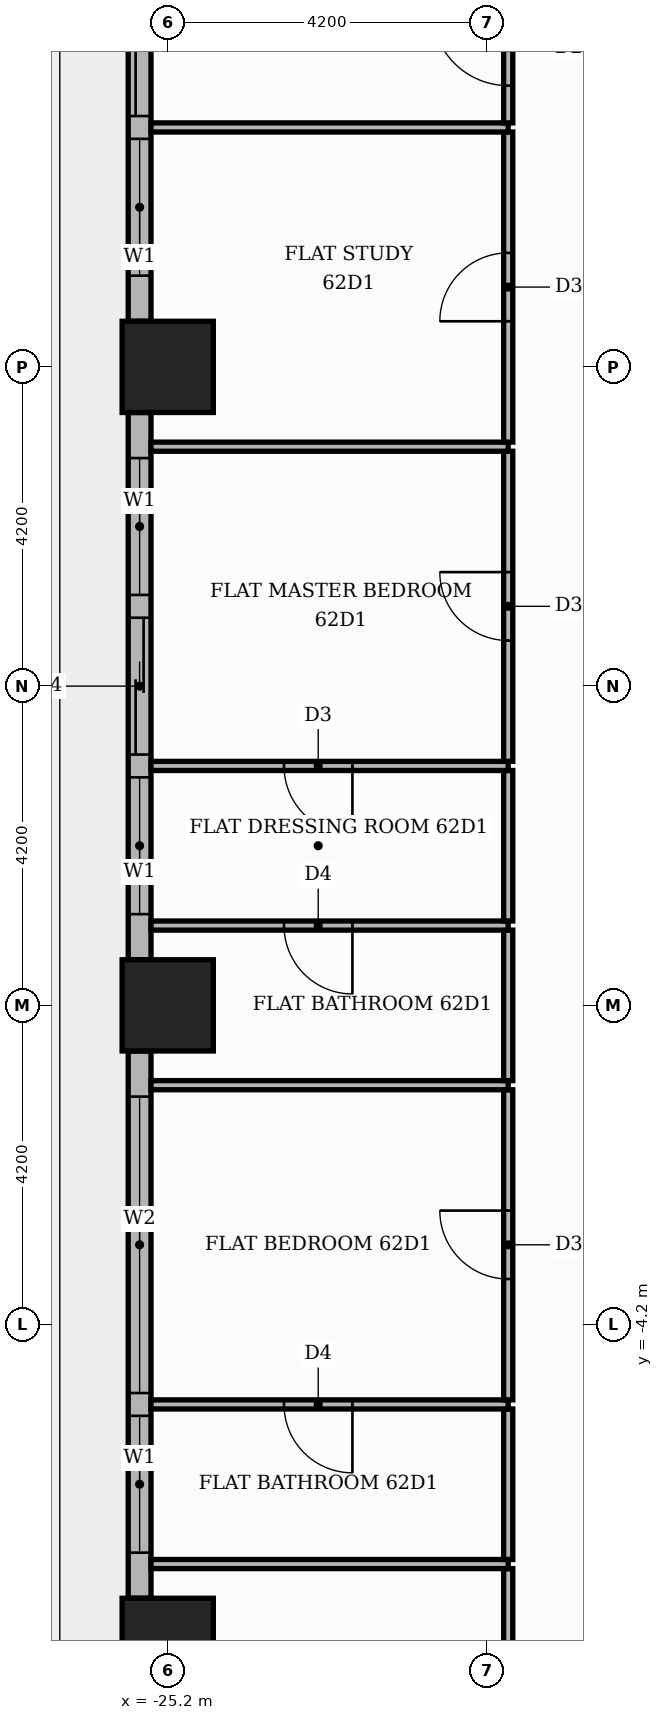
"""IFC4 building model, lengths in metres.
Left out: names, types, materials, properties, quantities, classifications, styles, units other than length and angle.
Written with IfcOpenShell. Run it as: python <this file> out.ifc"""

import sys

from ifc_helpers import new_model, si_unit, direction, frame, frame_2d, origin, origin_2d, place, context, subcontext, project, spatial, rectangle, extrude, element, fill, save


model = new_model("IFC4")
c1 = context("Model", 3, precision=1e-05, world=origin(), true_north=direction((0.0, 1.0)))
c2 = subcontext(c1, "Body", "Model", "MODEL_VIEW")
j1 = project(units=[si_unit("LENGTHUNIT", "METRE"), si_unit("PLANEANGLEUNIT", "RADIAN")], contexts=[c1])
p1 = place(None, origin())
s1 = spatial("IfcSite", under=j1, at=p1, CompositionType="ELEMENT")
p2 = place(p1, origin())
s2 = spatial("IfcBuilding", under=s1, at=p2, CompositionType="ELEMENT")
p3 = place(p2, frame((0.0, 0.0, 260.1)))
s3 = spatial("IfcBuildingStorey", under=s2, at=p3, CompositionType="ELEMENT", Elevation=260.1)
for number, where, z_axis, x_axis in (
    (1, (-25.2, 0.0, 0.0), (0.0, 0.0, 1.0), (1.0, 0.0, 0.0)),
    (2, (-25.2, -8.4, 0.0), (0.0, 0.0, 1.0), (1.0, 0.0, 0.0)),
    (3, (-25.2, 8.4, 0.0), (0.0, 0.0, 1.0), (1.0, 0.0, 0.0)),
):
    element("IfcColumn", number, at=place(p3, frame(where, z_axis=z_axis, x_axis=x_axis)), inside=s3, PredefinedType="COLUMN", context=c2, shape_type="SweptSolid", body=[
        extrude(rectangle(XDim=1.2, YDim=1.2, at=origin_2d()), origin(), (0.0, 0.0, 1.0), 3.9),
    ])
p4 = place(p3, frame((-25.57, 16.2, 0.0), z_axis=(0.0, 0.0, 1.0), x_axis=(0.0, -1.0, 0.0)))
e4 = element("IfcWall", 4, at=p4, inside=s3, PredefinedType="STANDARD", context=c2, shape_type="SweptSolid", body=[
    extrude(rectangle(XDim=7.2, YDim=0.3, at=frame_2d((3.6, 0.0))), origin(), (0.0, 0.0, 1.0), 3.48),
])
p5 = place(p4, frame((0.6, 0.0, 0.0)))
e5 = element("IfcOpeningElement", 5, at=p5, cuts=e4, PredefinedType="OPENING", context=c2, shape_type="SweptSolid", body=[
    extrude(rectangle(XDim=3.9, YDim=2.4, at=frame_2d((1.95, 1.2))), frame((0.0, 0.16, 0.0), z_axis=(0.0, -1.0, 0.0), x_axis=(1.0, 0.0, 0.0)), (0.0, 0.0, 1.0), 0.32),
])
p6 = place(p4, frame((4.8, 0.0, 0.9)))
e6 = element("IfcOpeningElement", 6, at=p6, cuts=e4, PredefinedType="OPENING", context=c2, shape_type="SweptSolid", body=[
    extrude(rectangle(XDim=1.8, YDim=2.1, at=frame_2d((0.9, 1.05))), frame((0.0, 0.16, 0.0), z_axis=(0.0, -1.0, 0.0), x_axis=(1.0, 0.0, 0.0)), (0.0, 0.0, 1.0), 0.32),
])
p7 = place(p3, frame((-25.57, 7.8, 0.0), z_axis=(0.0, 0.0, 1.0), x_axis=(0.0, -1.0, 0.0)))
e7 = element("IfcWall", 7, at=p7, inside=s3, PredefinedType="STANDARD", context=c2, shape_type="SweptSolid", body=[
    extrude(rectangle(XDim=7.2, YDim=0.3, at=frame_2d((3.6, 0.0))), origin(), (0.0, 0.0, 1.0), 3.48),
])
p8 = place(p7, frame((0.6, 0.0, 0.9)))
e8 = element("IfcOpeningElement", 8, at=p8, cuts=e7, PredefinedType="OPENING", context=c2, shape_type="SweptSolid", body=[
    extrude(rectangle(XDim=1.8, YDim=2.1, at=frame_2d((0.9, 1.05))), frame((0.0, 0.16, 0.0), z_axis=(0.0, -1.0, 0.0), x_axis=(1.0, 0.0, 0.0)), (0.0, 0.0, 1.0), 0.32),
])
p9 = place(p7, frame((2.7, 0.0, 0.0)))
e9 = element("IfcOpeningElement", 9, at=p9, cuts=e7, PredefinedType="OPENING", context=c2, shape_type="SweptSolid", body=[
    extrude(rectangle(XDim=1.8, YDim=2.4, at=frame_2d((0.9, 1.2))), frame((0.0, 0.16, 0.0), z_axis=(0.0, -1.0, 0.0), x_axis=(1.0, 0.0, 0.0)), (0.0, 0.0, 1.0), 0.32),
])
p10 = place(p7, frame((4.8, 0.0, 0.9)))
e10 = element("IfcOpeningElement", 10, at=p10, cuts=e7, PredefinedType="OPENING", context=c2, shape_type="SweptSolid", body=[
    extrude(rectangle(XDim=1.8, YDim=2.1, at=frame_2d((0.9, 1.05))), frame((0.0, 0.16, 0.0), z_axis=(0.0, -1.0, 0.0), x_axis=(1.0, 0.0, 0.0)), (0.0, 0.0, 1.0), 0.32),
])
p11 = place(p3, frame((-25.57, -0.6, 0.0), z_axis=(0.0, 0.0, 1.0), x_axis=(0.0, -1.0, 0.0)))
e11 = element("IfcWall", 11, at=p11, inside=s3, PredefinedType="STANDARD", context=c2, shape_type="SweptSolid", body=[
    extrude(rectangle(XDim=7.2, YDim=0.3, at=frame_2d((3.6, 0.0))), origin(), (0.0, 0.0, 1.0), 3.48),
])
p12 = place(p11, frame((0.6, 0.0, 0.9)))
e12 = element("IfcOpeningElement", 12, at=p12, cuts=e11, PredefinedType="OPENING", context=c2, shape_type="SweptSolid", body=[
    extrude(rectangle(XDim=3.9, YDim=2.1, at=frame_2d((1.95, 1.05))), frame((0.0, 0.16, 0.0), z_axis=(0.0, -1.0, 0.0), x_axis=(1.0, 0.0, 0.0)), (0.0, 0.0, 1.0), 0.32),
])
p13 = place(p11, frame((4.8, 0.0, 0.9)))
e13 = element("IfcOpeningElement", 13, at=p13, cuts=e11, PredefinedType="OPENING", context=c2, shape_type="SweptSolid", body=[
    extrude(rectangle(XDim=1.8, YDim=2.1, at=frame_2d((0.9, 1.05))), frame((0.0, 0.16, 0.0), z_axis=(0.0, -1.0, 0.0), x_axis=(1.0, 0.0, 0.0)), (0.0, 0.0, 1.0), 0.32),
])
p14 = place(p3, frame((-20.72, -11.49, 0.0), z_axis=(0.0, 0.0, 1.0), x_axis=(0.0, 1.0, 0.0)))
e14 = element("IfcWall", 14, at=p14, inside=s3, PredefinedType="PARTITIONING", context=c2, shape_type="SweptSolid", body=[
    extrude(rectangle(XDim=4.08, YDim=0.12, at=frame_2d((2.04, 0.0))), origin(), (0.0, 0.0, 1.0), 3.48),
])
p15 = place(p14, frame((1.59, 0.0, 0.0)))
e15 = element("IfcOpeningElement", 15, at=p15, cuts=e14, PredefinedType="OPENING", context=c2, shape_type="SweptSolid", body=[
    extrude(rectangle(XDim=0.9, YDim=2.1, at=frame_2d((0.45, 1.05))), frame((0.0, 0.07, 0.0), z_axis=(0.0, -1.0, 0.0), x_axis=(1.0, 0.0, 0.0)), (0.0, 0.0, 1.0), 0.14),
])
p16 = place(p3, frame((-25.42, -7.35, 0.0), z_axis=(0.0, 0.0, 1.0), x_axis=(1.0, 0.0, 0.0)))
e16 = element("IfcWall", 16, at=p16, inside=s3, PredefinedType="PARTITIONING", context=c2, shape_type="SweptSolid", body=[
    extrude(rectangle(XDim=4.7, YDim=0.12, at=frame_2d((2.35, 0.0))), origin(), (0.0, 0.0, 1.0), 3.48),
])
p17 = place(p3, frame((-20.72, -7.29, 0.0), z_axis=(0.0, 0.0, 1.0), x_axis=(0.0, 1.0, 0.0)))
e17 = element("IfcWall", 17, at=p17, inside=s3, PredefinedType="PARTITIONING", context=c2, shape_type="SweptSolid", body=[
    extrude(rectangle(XDim=1.98, YDim=0.12, at=frame_2d((0.99, 0.0))), origin(), (0.0, 0.0, 1.0), 3.48),
])
p18 = place(p3, frame((-25.42, -5.25, 0.0), z_axis=(0.0, 0.0, 1.0), x_axis=(1.0, 0.0, 0.0)))
e18 = element("IfcWall", 18, at=p18, inside=s3, PredefinedType="PARTITIONING", context=c2, shape_type="SweptSolid", body=[
    extrude(rectangle(XDim=4.7, YDim=0.12, at=frame_2d((2.35, 0.0))), origin(), (0.0, 0.0, 1.0), 3.48),
])
p19 = place(p18, frame((1.75, 0.0, 0.0)))
e19 = element("IfcOpeningElement", 19, at=p19, cuts=e18, PredefinedType="OPENING", context=c2, shape_type="SweptSolid", body=[
    extrude(rectangle(XDim=0.9, YDim=2.1, at=frame_2d((0.45, 1.05))), frame((0.0, 0.07, 0.0), z_axis=(0.0, -1.0, 0.0), x_axis=(1.0, 0.0, 0.0)), (0.0, 0.0, 1.0), 0.14),
])
p20 = place(p3, frame((-20.72, -5.19, 0.0), z_axis=(0.0, 0.0, 1.0), x_axis=(0.0, 1.0, 0.0)))
e20 = element("IfcWall", 20, at=p20, inside=s3, PredefinedType="PARTITIONING", context=c2, shape_type="SweptSolid", body=[
    extrude(rectangle(XDim=4.08, YDim=0.12, at=frame_2d((2.04, 0.0))), origin(), (0.0, 0.0, 1.0), 3.48),
])
p21 = place(p20, frame((1.59, 0.0, 0.0)))
e21 = element("IfcOpeningElement", 21, at=p21, cuts=e20, PredefinedType="OPENING", context=c2, shape_type="SweptSolid", body=[
    extrude(rectangle(XDim=0.9, YDim=2.1, at=frame_2d((0.45, 1.05))), frame((0.0, 0.07, 0.0), z_axis=(0.0, -1.0, 0.0), x_axis=(1.0, 0.0, 0.0)), (0.0, 0.0, 1.0), 0.14),
])
p22 = place(p3, frame((-25.42, -1.05, 0.0), z_axis=(0.0, 0.0, 1.0), x_axis=(1.0, 0.0, 0.0)))
e22 = element("IfcWall", 22, at=p22, inside=s3, PredefinedType="PARTITIONING", context=c2, shape_type="SweptSolid", body=[
    extrude(rectangle(XDim=4.7, YDim=0.12, at=frame_2d((2.35, 0.0))), origin(), (0.0, 0.0, 1.0), 3.48),
])
p23 = place(p3, frame((-20.72, -0.99, 0.0), z_axis=(0.0, 0.0, 1.0), x_axis=(0.0, 1.0, 0.0)))
e23 = element("IfcWall", 23, at=p23, inside=s3, PredefinedType="PARTITIONING", context=c2, shape_type="SweptSolid", body=[
    extrude(rectangle(XDim=1.98, YDim=0.12, at=frame_2d((0.99, 0.0))), origin(), (0.0, 0.0, 1.0), 3.48),
])
p24 = place(p3, frame((-25.42, 1.05, 0.0), z_axis=(0.0, 0.0, 1.0), x_axis=(1.0, 0.0, 0.0)))
e24 = element("IfcWall", 24, at=p24, inside=s3, PredefinedType="PARTITIONING", context=c2, shape_type="SweptSolid", body=[
    extrude(rectangle(XDim=4.7, YDim=0.12, at=frame_2d((2.35, 0.0))), origin(), (0.0, 0.0, 1.0), 3.48),
])
p25 = place(p24, frame((1.75, 0.0, 0.0)))
e25 = element("IfcOpeningElement", 25, at=p25, cuts=e24, PredefinedType="OPENING", context=c2, shape_type="SweptSolid", body=[
    extrude(rectangle(XDim=0.9, YDim=2.1, at=frame_2d((0.45, 1.05))), frame((0.0, 0.07, 0.0), z_axis=(0.0, -1.0, 0.0), x_axis=(1.0, 0.0, 0.0)), (0.0, 0.0, 1.0), 0.14),
])
p26 = place(p3, frame((-20.72, 1.11, 0.0), z_axis=(0.0, 0.0, 1.0), x_axis=(0.0, 1.0, 0.0)))
e26 = element("IfcWall", 26, at=p26, inside=s3, PredefinedType="PARTITIONING", context=c2, shape_type="SweptSolid", body=[
    extrude(rectangle(XDim=1.98, YDim=0.12, at=frame_2d((0.99, 0.0))), origin(), (0.0, 0.0, 1.0), 3.48),
])
p27 = place(p3, frame((-25.42, 3.15, 0.0), z_axis=(0.0, 0.0, 1.0), x_axis=(1.0, 0.0, 0.0)))
e27 = element("IfcWall", 27, at=p27, inside=s3, PredefinedType="PARTITIONING", context=c2, shape_type="SweptSolid", body=[
    extrude(rectangle(XDim=4.7, YDim=0.12, at=frame_2d((2.35, 0.0))), origin(), (0.0, 0.0, 1.0), 3.48),
])
p28 = place(p27, frame((1.75, 0.0, 0.0)))
e28 = element("IfcOpeningElement", 28, at=p28, cuts=e27, PredefinedType="OPENING", context=c2, shape_type="SweptSolid", body=[
    extrude(rectangle(XDim=0.9, YDim=2.1, at=frame_2d((0.45, 1.05))), frame((0.0, 0.07, 0.0), z_axis=(0.0, -1.0, 0.0), x_axis=(1.0, 0.0, 0.0)), (0.0, 0.0, 1.0), 0.14),
])
p29 = place(p3, frame((-20.72, 3.21, 0.0), z_axis=(0.0, 0.0, 1.0), x_axis=(0.0, 1.0, 0.0)))
e29 = element("IfcWall", 29, at=p29, inside=s3, PredefinedType="PARTITIONING", context=c2, shape_type="SweptSolid", body=[
    extrude(rectangle(XDim=4.08, YDim=0.12, at=frame_2d((2.04, 0.0))), origin(), (0.0, 0.0, 1.0), 3.48),
])
p30 = place(p29, frame((1.59, 0.0, 0.0)))
e30 = element("IfcOpeningElement", 30, at=p30, cuts=e29, PredefinedType="OPENING", context=c2, shape_type="SweptSolid", body=[
    extrude(rectangle(XDim=0.9, YDim=2.1, at=frame_2d((0.45, 1.05))), frame((0.0, 0.07, 0.0), z_axis=(0.0, -1.0, 0.0), x_axis=(1.0, 0.0, 0.0)), (0.0, 0.0, 1.0), 0.14),
])
p31 = place(p3, frame((-25.42, 7.35, 0.0), z_axis=(0.0, 0.0, 1.0), x_axis=(1.0, 0.0, 0.0)))
e31 = element("IfcWall", 31, at=p31, inside=s3, PredefinedType="PARTITIONING", context=c2, shape_type="SweptSolid", body=[
    extrude(rectangle(XDim=4.7, YDim=0.12, at=frame_2d((2.35, 0.0))), origin(), (0.0, 0.0, 1.0), 3.48),
])
p32 = place(p3, frame((-20.72, 7.41, 0.0), z_axis=(0.0, 0.0, 1.0), x_axis=(0.0, 1.0, 0.0)))
e32 = element("IfcWall", 32, at=p32, inside=s3, PredefinedType="PARTITIONING", context=c2, shape_type="SweptSolid", body=[
    extrude(rectangle(XDim=4.08, YDim=0.12, at=frame_2d((2.04, 0.0))), origin(), (0.0, 0.0, 1.0), 3.48),
])
p33 = place(p32, frame((1.59, 0.0, 0.0)))
e33 = element("IfcOpeningElement", 33, at=p33, cuts=e32, PredefinedType="OPENING", context=c2, shape_type="SweptSolid", body=[
    extrude(rectangle(XDim=0.9, YDim=2.1, at=frame_2d((0.45, 1.05))), frame((0.0, 0.07, 0.0), z_axis=(0.0, -1.0, 0.0), x_axis=(1.0, 0.0, 0.0)), (0.0, 0.0, 1.0), 0.14),
])
p34 = place(p3, frame((-25.42, 11.55, 0.0), z_axis=(0.0, 0.0, 1.0), x_axis=(1.0, 0.0, 0.0)))
e34 = element("IfcWall", 34, at=p34, inside=s3, PredefinedType="PARTITIONING", context=c2, shape_type="SweptSolid", body=[
    extrude(rectangle(XDim=4.7, YDim=0.12, at=frame_2d((2.35, 0.0))), origin(), (0.0, 0.0, 1.0), 3.48),
])
p35 = place(p3, frame((-20.72, 11.61, 0.0), z_axis=(0.0, 0.0, 1.0), x_axis=(0.0, 1.0, 0.0)))
e35 = element("IfcWall", 35, at=p35, inside=s3, PredefinedType="PARTITIONING", context=c2, shape_type="SweptSolid", body=[
    extrude(rectangle(XDim=1.98, YDim=0.12, at=frame_2d((0.99, 0.0))), origin(), (0.0, 0.0, 1.0), 3.48),
])
p36 = place(p35, frame((0.49, 0.0, 0.0)))
e36 = element("IfcOpeningElement", 36, at=p36, cuts=e35, PredefinedType="OPENING", context=c2, shape_type="SweptSolid", body=[
    extrude(rectangle(XDim=1.0, YDim=2.1, at=frame_2d((0.5, 1.05))), frame((0.0, 0.07, 0.0), z_axis=(0.0, -1.0, 0.0), x_axis=(1.0, 0.0, 0.0)), (0.0, 0.0, 1.0), 0.14),
])
p37 = place(p5, origin())
e37 = element("IfcDoor", 37, at=p37, inside=s3, OperationType="SLIDING_TO_LEFT", PredefinedType="DOOR", context=c2, shape_type="SweptSolid", body=[
    extrude(rectangle(XDim=3.9, YDim=2.4, at=frame_2d((1.95, 1.2))), frame((0.0, 0.025, 0.0), z_axis=(0.0, -1.0, 0.0), x_axis=(1.0, 0.0, 0.0)), (0.0, 0.0, 1.0), 0.05),
])
fill(e5, e37)
p38 = place(p6, origin())
e38 = element("IfcWindow", 38, at=p38, inside=s3, PartitioningType="SINGLE_PANEL", PredefinedType="WINDOW", context=c2, shape_type="SweptSolid", body=[
    extrude(rectangle(XDim=1.8, YDim=2.1, at=frame_2d((0.9, 1.05))), frame((0.0, 0.03, 0.0), z_axis=(0.0, -1.0, 0.0), x_axis=(1.0, 0.0, 0.0)), (0.0, 0.0, 1.0), 0.06),
])
fill(e6, e38)
p39 = place(p8, origin())
e39 = element("IfcWindow", 39, at=p39, inside=s3, PartitioningType="SINGLE_PANEL", PredefinedType="WINDOW", context=c2, shape_type="SweptSolid", body=[
    extrude(rectangle(XDim=1.8, YDim=2.1, at=frame_2d((0.9, 1.05))), frame((0.0, 0.03, 0.0), z_axis=(0.0, -1.0, 0.0), x_axis=(1.0, 0.0, 0.0)), (0.0, 0.0, 1.0), 0.06),
])
fill(e8, e39)
p40 = place(p9, origin())
e40 = element("IfcDoor", 40, at=p40, inside=s3, OperationType="SLIDING_TO_LEFT", PredefinedType="DOOR", context=c2, shape_type="SweptSolid", body=[
    extrude(rectangle(XDim=1.8, YDim=2.4, at=frame_2d((0.9, 1.2))), frame((0.0, 0.025, 0.0), z_axis=(0.0, -1.0, 0.0), x_axis=(1.0, 0.0, 0.0)), (0.0, 0.0, 1.0), 0.05),
])
fill(e9, e40)
p41 = place(p10, origin())
e41 = element("IfcWindow", 41, at=p41, inside=s3, PartitioningType="SINGLE_PANEL", PredefinedType="WINDOW", context=c2, shape_type="SweptSolid", body=[
    extrude(rectangle(XDim=1.8, YDim=2.1, at=frame_2d((0.9, 1.05))), frame((0.0, 0.03, 0.0), z_axis=(0.0, -1.0, 0.0), x_axis=(1.0, 0.0, 0.0)), (0.0, 0.0, 1.0), 0.06),
])
fill(e10, e41)
p42 = place(p12, origin())
e42 = element("IfcWindow", 42, at=p42, inside=s3, PartitioningType="SINGLE_PANEL", PredefinedType="WINDOW", context=c2, shape_type="SweptSolid", body=[
    extrude(rectangle(XDim=3.9, YDim=2.1, at=frame_2d((1.95, 1.05))), frame((0.0, 0.03, 0.0), z_axis=(0.0, -1.0, 0.0), x_axis=(1.0, 0.0, 0.0)), (0.0, 0.0, 1.0), 0.06),
])
fill(e12, e42)
p43 = place(p13, origin())
e43 = element("IfcWindow", 43, at=p43, inside=s3, PartitioningType="SINGLE_PANEL", PredefinedType="WINDOW", context=c2, shape_type="SweptSolid", body=[
    extrude(rectangle(XDim=1.8, YDim=2.1, at=frame_2d((0.9, 1.05))), frame((0.0, 0.03, 0.0), z_axis=(0.0, -1.0, 0.0), x_axis=(1.0, 0.0, 0.0)), (0.0, 0.0, 1.0), 0.06),
])
fill(e13, e43)
p44 = place(p36, origin())
e44 = element("IfcDoor", 44, at=p44, inside=s3, OperationType="SINGLE_SWING_RIGHT", PredefinedType="DOOR", context=c2, shape_type="SweptSolid", body=[
    extrude(rectangle(XDim=1.0, YDim=2.1, at=frame_2d((0.5, 1.05))), frame((0.0, 0.025, 0.0), z_axis=(0.0, -1.0, 0.0), x_axis=(1.0, 0.0, 0.0)), (0.0, 0.0, 1.0), 0.05),
])
fill(e36, e44)
p45 = place(p33, origin())
e45 = element("IfcDoor", 45, at=p45, inside=s3, OperationType="SINGLE_SWING_LEFT", PredefinedType="DOOR", context=c2, shape_type="SweptSolid", body=[
    extrude(rectangle(XDim=0.9, YDim=2.1, at=frame_2d((0.45, 1.05))), frame((0.0, 0.025, 0.0), z_axis=(0.0, -1.0, 0.0), x_axis=(1.0, 0.0, 0.0)), (0.0, 0.0, 1.0), 0.05),
])
fill(e33, e45)
p46 = place(p30, origin())
e46 = element("IfcDoor", 46, at=p46, inside=s3, OperationType="SINGLE_SWING_RIGHT", PredefinedType="DOOR", context=c2, shape_type="SweptSolid", body=[
    extrude(rectangle(XDim=0.9, YDim=2.1, at=frame_2d((0.45, 1.05))), frame((0.0, 0.025, 0.0), z_axis=(0.0, -1.0, 0.0), x_axis=(1.0, 0.0, 0.0)), (0.0, 0.0, 1.0), 0.05),
])
fill(e30, e46)
p47 = place(p28, frame((0.9, 0.0, 0.0), z_axis=(0.0, 0.0, 1.0), x_axis=(-1.0, 0.0, 0.0)))
e47 = element("IfcDoor", 47, at=p47, inside=s3, OperationType="SINGLE_SWING_RIGHT", PredefinedType="DOOR", context=c2, shape_type="SweptSolid", body=[
    extrude(rectangle(XDim=0.9, YDim=2.1, at=frame_2d((0.45, 1.05))), frame((0.0, 0.025, 0.0), z_axis=(0.0, -1.0, 0.0), x_axis=(1.0, 0.0, 0.0)), (0.0, 0.0, 1.0), 0.05),
])
fill(e28, e47)
p48 = place(p25, frame((0.9, 0.0, 0.0), z_axis=(0.0, 0.0, 1.0), x_axis=(-1.0, 0.0, 0.0)))
e48 = element("IfcDoor", 48, at=p48, inside=s3, OperationType="SINGLE_SWING_RIGHT", PredefinedType="DOOR", context=c2, shape_type="SweptSolid", body=[
    extrude(rectangle(XDim=0.9, YDim=2.1, at=frame_2d((0.45, 1.05))), frame((0.0, 0.025, 0.0), z_axis=(0.0, -1.0, 0.0), x_axis=(1.0, 0.0, 0.0)), (0.0, 0.0, 1.0), 0.05),
])
fill(e25, e48)
p49 = place(p21, origin())
e49 = element("IfcDoor", 49, at=p49, inside=s3, OperationType="SINGLE_SWING_RIGHT", PredefinedType="DOOR", context=c2, shape_type="SweptSolid", body=[
    extrude(rectangle(XDim=0.9, YDim=2.1, at=frame_2d((0.45, 1.05))), frame((0.0, 0.025, 0.0), z_axis=(0.0, -1.0, 0.0), x_axis=(1.0, 0.0, 0.0)), (0.0, 0.0, 1.0), 0.05),
])
fill(e21, e49)
p50 = place(p19, frame((0.9, 0.0, 0.0), z_axis=(0.0, 0.0, 1.0), x_axis=(-1.0, 0.0, 0.0)))
e50 = element("IfcDoor", 50, at=p50, inside=s3, OperationType="SINGLE_SWING_RIGHT", PredefinedType="DOOR", context=c2, shape_type="SweptSolid", body=[
    extrude(rectangle(XDim=0.9, YDim=2.1, at=frame_2d((0.45, 1.05))), frame((0.0, 0.025, 0.0), z_axis=(0.0, -1.0, 0.0), x_axis=(1.0, 0.0, 0.0)), (0.0, 0.0, 1.0), 0.05),
])
fill(e19, e50)
save(model, sys.argv[1])
